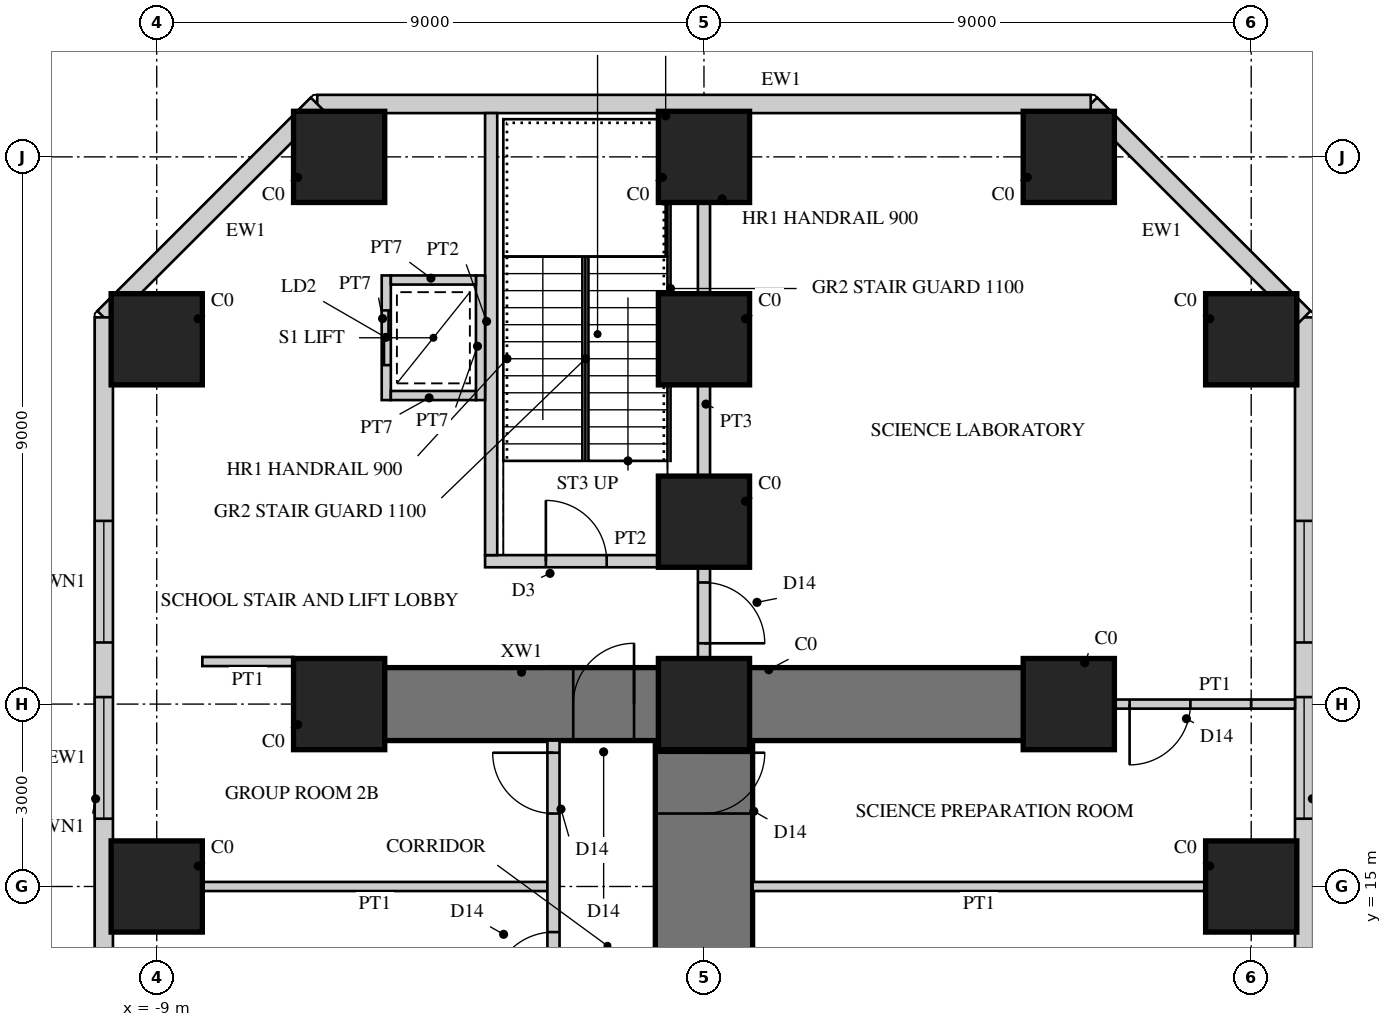
"""IFC4 building model, lengths in metres.
Left out: names, types, materials, properties, quantities, classifications, styles, units other than length and angle.
Written with IfcOpenShell. Run it as: python <this file> out.ifc"""

import sys

from ifc_helpers import new_model, si_unit, direction, frame, frame_2d, origin, origin_2d, place, context, subcontext, project, spatial, rectangle, hollow_rectangle, extrude, element, fill, save


model = new_model("IFC4")
c1 = context("Model", 3, precision=1e-05, world=origin(), true_north=direction((0.0, 1.0)))
c2 = subcontext(c1, "Body", "Model", "MODEL_VIEW")
j1 = project(units=[si_unit("LENGTHUNIT", "METRE"), si_unit("PLANEANGLEUNIT", "RADIAN")], contexts=[c1])
p1 = place(None, origin())
s1 = spatial("IfcSite", under=j1, at=p1, CompositionType="ELEMENT")
p2 = place(p1, origin())
s2 = spatial("IfcBuilding", under=s1, at=p2, CompositionType="ELEMENT")
p3 = place(p2, frame((0.0, 0.0, 9.5)))
s3 = spatial("IfcBuildingStorey", under=s2, at=p3, CompositionType="ELEMENT", Elevation=9.5)
p4 = place(p3, frame((0.0, 9.0, 0.0), z_axis=(0.0, 0.0, 1.0), x_axis=(0.0, 1.0, 0.0)))
e1 = element("IfcWall", 1, at=p4, inside=s3, PredefinedType="SHEAR", context=c2, shape_type="SweptSolid", body=[
    extrude(rectangle(XDim=9.0, YDim=1.6, at=frame_2d((4.5, 0.0))), origin(), (0.0, 0.0, 1.0), 4.5),
])
p5 = place(p4, frame((1.85, 0.0, 0.0)))
e2 = element("IfcOpeningElement", 2, at=p5, cuts=e1, PredefinedType="OPENING", context=c2, shape_type="SweptSolid", body=[
    extrude(rectangle(XDim=1.0, YDim=2.2, at=frame_2d((0.5, 1.1))), frame((0.0, 0.81, 0.0), z_axis=(0.0, -1.0, 0.0), x_axis=(1.0, 0.0, 0.0)), (0.0, 0.0, 1.0), 1.62),
])
p6 = place(p4, frame((7.2, 0.0, 0.0)))
e3 = element("IfcOpeningElement", 3, at=p6, cuts=e1, PredefinedType="OPENING", context=c2, shape_type="SweptSolid", body=[
    extrude(rectangle(XDim=1.0, YDim=2.2, at=frame_2d((0.5, 1.1))), frame((0.0, 0.81, 0.0), z_axis=(0.0, -1.0, 0.0), x_axis=(1.0, 0.0, 0.0)), (0.0, 0.0, 1.0), 1.62),
])
p7 = place(p3, frame((0.0, 18.0, 0.0), z_axis=(0.0, 0.0, 1.0), x_axis=(-1.0, 0.0, 0.0)))
e4 = element("IfcWall", 4, at=p7, inside=s3, PredefinedType="SHEAR", context=c2, shape_type="SweptSolid", body=[
    extrude(rectangle(XDim=6.0, YDim=1.2, at=frame_2d((3.0, 0.0))), origin(), (0.0, 0.0, 1.0), 4.5),
])
p8 = place(p7, frame((1.15, 0.0, 0.0)))
e5 = element("IfcOpeningElement", 5, at=p8, cuts=e4, PredefinedType="OPENING", context=c2, shape_type="SweptSolid", body=[
    extrude(rectangle(XDim=1.0, YDim=2.2, at=frame_2d((0.5, 1.1))), frame((0.0, 0.61, 0.0), z_axis=(0.0, -1.0, 0.0), x_axis=(1.0, 0.0, 0.0)), (0.0, 0.0, 1.0), 1.22),
])
p9 = place(p3, frame((0.0, 18.0, 0.0), z_axis=(0.0, 0.0, 1.0), x_axis=(1.0, 0.0, 0.0)))
e6 = element("IfcWall", 6, at=p9, inside=s3, PredefinedType="SHEAR", context=c2, shape_type="SweptSolid", body=[
    extrude(rectangle(XDim=6.0, YDim=1.2, at=frame_2d((3.0, 0.0))), origin(), (0.0, 0.0, 1.0), 4.5),
])
for number, where, z_axis, x_axis in (
    (7, (9.0, 15.0, 0.0), (0.0, 0.0, 1.0), (1.0, 0.0, 0.0)),
    (8, (9.0, 24.0, 0.0), (0.0, 0.0, 1.0), (1.0, 0.0, 0.0)),
    (9, (-9.0, 15.0, 0.0), (0.0, 0.0, 1.0), (1.0, 0.0, 0.0)),
    (10, (-9.0, 24.0, 0.0), (0.0, 0.0, 1.0), (1.0, 0.0, 0.0)),
    (11, (6.0, 27.0, 0.0), (0.0, 0.0, 1.0), (1.0, 0.0, 0.0)),
    (12, (0.0, 27.0, 0.0), (0.0, 0.0, 1.0), (1.0, 0.0, 0.0)),
    (13, (-6.0, 27.0, 0.0), (0.0, 0.0, 1.0), (1.0, 0.0, 0.0)),
    (14, (6.0, 18.0, 0.0), (0.0, 0.0, 1.0), (1.0, 0.0, 0.0)),
    (15, (0.0, 18.0, 0.0), (0.0, 0.0, 1.0), (1.0, 0.0, 0.0)),
    (16, (-6.0, 18.0, 0.0), (0.0, 0.0, 1.0), (1.0, 0.0, 0.0)),
    (17, (0.0, 21.0, 0.0), (0.0, 0.0, 1.0), (1.0, 0.0, 0.0)),
    (18, (0.0, 24.0, 0.0), (0.0, 0.0, 1.0), (1.0, 0.0, 0.0)),
):
    element("IfcColumn", number, at=place(p3, frame(where, z_axis=z_axis, x_axis=x_axis)), inside=s3, PredefinedType="COLUMN", context=c2, shape_type="SweptSolid", body=[
        extrude(rectangle(XDim=1.5, YDim=1.5, at=origin_2d()), origin(), (0.0, 0.0, 1.0), 4.5),
    ])
p10 = place(p3, frame((9.87, 9.87, 0.0), z_axis=(0.0, 0.0, 1.0), x_axis=(0.0, 1.0, 0.0)))
e19 = element("IfcWall", 19, at=p10, inside=s3, PredefinedType="SOLIDWALL", context=c2, shape_type="SweptSolid", body=[
    extrude(rectangle(XDim=14.49, YDim=0.3, at=frame_2d((7.245, 0.0))), origin(), (0.0, 0.0, 1.0), 4.3),
])
p11 = place(p10, frame((6.245, 0.0, 0.9)))
e20 = element("IfcOpeningElement", 20, at=p11, cuts=e19, PredefinedType="OPENING", context=c2, shape_type="SweptSolid", body=[
    extrude(rectangle(XDim=2.0, YDim=1.8, at=frame_2d((1.0, 0.9))), frame((0.0, 0.16, 0.0), z_axis=(0.0, -1.0, 0.0), x_axis=(1.0, 0.0, 0.0)), (0.0, 0.0, 1.0), 0.32),
])
p12 = place(p10, frame((9.143, 0.0, 0.9)))
e21 = element("IfcOpeningElement", 21, at=p12, cuts=e19, PredefinedType="OPENING", context=c2, shape_type="SweptSolid", body=[
    extrude(rectangle(XDim=2.0, YDim=1.8, at=frame_2d((1.0, 0.9))), frame((0.0, 0.16, 0.0), z_axis=(0.0, -1.0, 0.0), x_axis=(1.0, 0.0, 0.0)), (0.0, 0.0, 1.0), 0.32),
])
p13 = place(p3, frame((9.87, 24.36, 0.0), z_axis=(0.0, 0.0, 1.0), x_axis=(-0.707106781187, 0.707106781187, 0.0)))
e22 = element("IfcWall", 22, at=p13, inside=s3, PredefinedType="SOLIDWALL", context=c2, shape_type="SweptSolid", body=[
    extrude(rectangle(XDim=4.964, YDim=0.3, at=frame_2d((2.482, 0.0))), origin(), (0.0, 0.0, 1.0), 4.3),
])
p14 = place(p3, frame((6.36, 27.87, 0.0), z_axis=(0.0, 0.0, 1.0), x_axis=(-1.0, 0.0, 0.0)))
e23 = element("IfcWall", 23, at=p14, inside=s3, PredefinedType="SOLIDWALL", context=c2, shape_type="SweptSolid", body=[
    extrude(rectangle(XDim=12.721, YDim=0.3, at=frame_2d((6.36, 0.0))), origin(), (0.0, 0.0, 1.0), 4.3),
])
p15 = place(p3, frame((-6.36, 27.87, 0.0), z_axis=(0.0, 0.0, 1.0), x_axis=(-0.707106781187, -0.707106781187, 0.0)))
e24 = element("IfcWall", 24, at=p15, inside=s3, PredefinedType="SOLIDWALL", context=c2, shape_type="SweptSolid", body=[
    extrude(rectangle(XDim=4.964, YDim=0.3, at=frame_2d((2.482, 0.0))), origin(), (0.0, 0.0, 1.0), 4.3),
])
p16 = place(p3, frame((-9.87, 24.36, 0.0), z_axis=(0.0, 0.0, 1.0), x_axis=(0.0, -1.0, 0.0)))
e25 = element("IfcWall", 25, at=p16, inside=s3, PredefinedType="SOLIDWALL", context=c2, shape_type="SweptSolid", body=[
    extrude(rectangle(XDim=14.49, YDim=0.3, at=frame_2d((7.245, 0.0))), origin(), (0.0, 0.0, 1.0), 4.3),
])
p17 = place(p16, frame((3.347, 0.0, 0.9)))
e26 = element("IfcOpeningElement", 26, at=p17, cuts=e25, PredefinedType="OPENING", context=c2, shape_type="SweptSolid", body=[
    extrude(rectangle(XDim=2.0, YDim=1.8, at=frame_2d((1.0, 0.9))), frame((0.0, 0.16, 0.0), z_axis=(0.0, -1.0, 0.0), x_axis=(1.0, 0.0, 0.0)), (0.0, 0.0, 1.0), 0.32),
])
p18 = place(p16, frame((6.245, 0.0, 0.9)))
e27 = element("IfcOpeningElement", 27, at=p18, cuts=e25, PredefinedType="OPENING", context=c2, shape_type="SweptSolid", body=[
    extrude(rectangle(XDim=2.0, YDim=1.8, at=frame_2d((1.0, 0.9))), frame((0.0, 0.16, 0.0), z_axis=(0.0, -1.0, 0.0), x_axis=(1.0, 0.0, 0.0)), (0.0, 0.0, 1.0), 0.32),
])
p19 = place(p3, frame((-2.575, 15.0, 0.0), z_axis=(0.0, 0.0, 1.0), x_axis=(-1.0, 0.0, 0.0)))
e28 = element("IfcWall", 28, at=p19, inside=s3, PredefinedType="PARTITIONING", context=c2, shape_type="SweptSolid", body=[
    extrude(rectangle(XDim=5.675, YDim=0.15, at=frame_2d((2.837, 0.0))), origin(), (0.0, 0.0, 1.0), 3.35),
])
p20 = place(p3, frame((8.25, 15.0, 0.0), z_axis=(0.0, 0.0, 1.0), x_axis=(-1.0, 0.0, 0.0)))
e29 = element("IfcWall", 29, at=p20, inside=s3, PredefinedType="PARTITIONING", context=c2, shape_type="SweptSolid", body=[
    extrude(rectangle(XDim=7.45, YDim=0.15, at=frame_2d((3.725, 0.0))), origin(), (0.0, 0.0, 1.0), 3.35),
])
p21 = place(p3, frame((-2.475, 9.65, 0.0), z_axis=(0.0, 0.0, 1.0), x_axis=(0.0, 1.0, 0.0)))
e30 = element("IfcWall", 30, at=p21, inside=s3, PredefinedType="SOLIDWALL", context=c2, shape_type="SweptSolid", body=[
    extrude(rectangle(XDim=7.75, YDim=0.2, at=frame_2d((3.875, 0.0))), origin(), (0.0, 0.0, 1.0), 4.3),
])
p22 = place(p21, frame((1.2, 0.0, 0.0)))
e31 = element("IfcOpeningElement", 31, at=p22, cuts=e30, PredefinedType="OPENING", context=c2, shape_type="SweptSolid", body=[
    extrude(rectangle(XDim=1.0, YDim=2.2, at=frame_2d((0.5, 1.1))), frame((0.0, 0.11, 0.0), z_axis=(0.0, -1.0, 0.0), x_axis=(1.0, 0.0, 0.0)), (0.0, 0.0, 1.0), 0.22),
])
p23 = place(p21, frame((3.6, 0.0, 0.0)))
e32 = element("IfcOpeningElement", 32, at=p23, cuts=e30, PredefinedType="OPENING", context=c2, shape_type="SweptSolid", body=[
    extrude(rectangle(XDim=1.0, YDim=2.2, at=frame_2d((0.5, 1.1))), frame((0.0, 0.11, 0.0), z_axis=(0.0, -1.0, 0.0), x_axis=(1.0, 0.0, 0.0)), (0.0, 0.0, 1.0), 0.22),
])
p24 = place(p21, frame((6.55, 0.0, 0.0)))
e33 = element("IfcOpeningElement", 33, at=p24, cuts=e30, PredefinedType="OPENING", context=c2, shape_type="SweptSolid", body=[
    extrude(rectangle(XDim=1.0, YDim=2.2, at=frame_2d((0.5, 1.1))), frame((0.0, 0.11, 0.0), z_axis=(0.0, -1.0, 0.0), x_axis=(1.0, 0.0, 0.0)), (0.0, 0.0, 1.0), 0.22),
])
p25 = place(p3, frame((-6.75, 18.7, 0.0), z_axis=(0.0, 0.0, 1.0), x_axis=(-1.0, 0.0, 0.0)))
e34 = element("IfcWall", 34, at=p25, inside=s3, PredefinedType="PARTITIONING", context=c2, shape_type="SweptSolid", body=[
    extrude(rectangle(XDim=1.5, YDim=0.15, at=frame_2d((0.75, 0.0))), origin(), (0.0, 0.0, 1.0), 4.3),
])
p26 = place(p3, frame((-0.1, 20.35, 0.0), z_axis=(0.0, 0.0, 1.0), x_axis=(-1.0, 0.0, 0.0)))
e35 = element("IfcWall", 35, at=p26, inside=s3, PredefinedType="SOLIDWALL", context=c2, shape_type="SweptSolid", body=[
    extrude(rectangle(XDim=3.5, YDim=0.2, at=frame_2d((1.75, 0.0))), origin(), (0.0, 0.0, 1.0), 4.3),
])
p27 = place(p26, frame((1.5, 0.0, 0.0)))
e36 = element("IfcOpeningElement", 36, at=p27, cuts=e35, PredefinedType="OPENING", context=c2, shape_type="SweptSolid", body=[
    extrude(rectangle(XDim=1.0, YDim=2.1, at=frame_2d((0.5, 1.05))), frame((0.0, 0.11, 0.0), z_axis=(0.0, -1.0, 0.0), x_axis=(1.0, 0.0, 0.0)), (0.0, 0.0, 1.0), 0.22),
])
p28 = place(p3, frame((-3.5, 20.45, 0.0), z_axis=(0.0, 0.0, 1.0), x_axis=(0.0, 1.0, 0.0)))
e37 = element("IfcWall", 37, at=p28, inside=s3, PredefinedType="SOLIDWALL", context=c2, shape_type="SweptSolid", body=[
    extrude(rectangle(XDim=7.27, YDim=0.2, at=frame_2d((3.635, 0.0))), origin(), (0.0, 0.0, 1.0), 4.3),
])
p29 = place(p3, frame((-3.675, 23.0, 0.0), z_axis=(0.0, 0.0, 1.0), x_axis=(0.0, 1.0, 0.0)))
e38 = element("IfcWall", 38, at=p29, inside=s3, PredefinedType="PARTITIONING", context=c2, shape_type="SweptSolid", body=[
    extrude(rectangle(XDim=2.05, YDim=0.15, at=frame_2d((1.025, 0.0))), origin(), (0.0, 0.0, 1.0), 4.3),
])
p30 = place(p3, frame((-5.225, 23.0, 0.0), z_axis=(0.0, 0.0, 1.0), x_axis=(0.0, 1.0, 0.0)))
e39 = element("IfcWall", 39, at=p30, inside=s3, PredefinedType="PARTITIONING", context=c2, shape_type="SweptSolid", body=[
    extrude(rectangle(XDim=2.05, YDim=0.15, at=frame_2d((1.025, 0.0))), origin(), (0.0, 0.0, 1.0), 4.3),
])
p31 = place(p30, frame((0.575, 0.0, 0.0)))
e40 = element("IfcOpeningElement", 40, at=p31, cuts=e39, PredefinedType="OPENING", context=c2, shape_type="SweptSolid", body=[
    extrude(rectangle(XDim=0.9, YDim=2.1, at=frame_2d((0.45, 1.05))), frame((0.0, 0.085, 0.0), z_axis=(0.0, -1.0, 0.0), x_axis=(1.0, 0.0, 0.0)), (0.0, 0.0, 1.0), 0.17),
])
for number, where, z_axis, x_axis in (
    (41, (-3.75, 23.075, 0.0), (0.0, 0.0, 1.0), (-1.0, 0.0, 0.0)),
    (42, (-3.75, 24.975, 0.0), (0.0, 0.0, 1.0), (-1.0, 0.0, 0.0)),
):
    element("IfcWall", number, at=place(p3, frame(where, z_axis=z_axis, x_axis=x_axis)), inside=s3, PredefinedType="PARTITIONING", context=c2, shape_type="SweptSolid", body=[
        extrude(rectangle(XDim=1.4, YDim=0.15, at=frame_2d((0.7, 0.0))), origin(), (0.0, 0.0, 1.0), 4.3),
    ])
p32 = place(p3, frame((6.75, 18.0, 0.0), z_axis=(0.0, 0.0, 1.0), x_axis=(1.0, 0.0, 0.0)))
e43 = element("IfcWall", 43, at=p32, inside=s3, PredefinedType="PARTITIONING", context=c2, shape_type="SweptSolid", body=[
    extrude(rectangle(XDim=2.25, YDim=0.15, at=frame_2d((1.125, 0.0))), origin(), (0.0, 0.0, 1.0), 3.35),
])
p33 = place(p32, frame((0.25, 0.0, 0.0)))
e44 = element("IfcOpeningElement", 44, at=p33, cuts=e43, PredefinedType="OPENING", context=c2, shape_type="SweptSolid", body=[
    extrude(rectangle(XDim=1.0, YDim=2.2, at=frame_2d((0.5, 1.1))), frame((0.0, 0.085, 0.0), z_axis=(0.0, -1.0, 0.0), x_axis=(1.0, 0.0, 0.0)), (0.0, 0.0, 1.0), 0.17),
])
p34 = place(p3, frame((9.0, 18.0, 0.0), z_axis=(0.0, 0.0, 1.0), x_axis=(1.0, 0.0, 0.0)))
e45 = element("IfcWall", 45, at=p34, inside=s3, PredefinedType="PARTITIONING", context=c2, shape_type="SweptSolid", body=[
    extrude(rectangle(XDim=0.72, YDim=0.15, at=frame_2d((0.36, 0.0))), origin(), (0.0, 0.0, 1.0), 4.3),
])
p35 = place(p3, frame((0.0, 18.0, 0.0), z_axis=(0.0, 0.0, 1.0), x_axis=(0.0, 1.0, 0.0)))
e46 = element("IfcWall", 46, at=p35, inside=s3, PredefinedType="SOLIDWALL", context=c2, shape_type="SweptSolid", body=[
    extrude(rectangle(XDim=3.0, YDim=0.2, at=frame_2d((1.5, 0.0))), origin(), (0.0, 0.0, 1.0), 4.3),
])
p36 = place(p35, frame((1.0, 0.0, 0.0)))
e47 = element("IfcOpeningElement", 47, at=p36, cuts=e46, PredefinedType="OPENING", context=c2, shape_type="SweptSolid", body=[
    extrude(rectangle(XDim=1.0, YDim=2.2, at=frame_2d((0.5, 1.1))), frame((0.0, 0.11, 0.0), z_axis=(0.0, -1.0, 0.0), x_axis=(1.0, 0.0, 0.0)), (0.0, 0.0, 1.0), 0.22),
])
p37 = place(p3, frame((0.0, 21.0, 0.0), z_axis=(0.0, 0.0, 1.0), x_axis=(0.0, 1.0, 0.0)))
e48 = element("IfcWall", 48, at=p37, inside=s3, PredefinedType="SOLIDWALL", context=c2, shape_type="SweptSolid", body=[
    extrude(rectangle(XDim=6.0, YDim=0.2, at=frame_2d((3.0, 0.0))), origin(), (0.0, 0.0, 1.0), 3.3),
])
p38 = place(p11, origin())
e49 = element("IfcWindow", 49, at=p38, inside=s3, PartitioningType="SINGLE_PANEL", PredefinedType="WINDOW", context=c2, shape_type="SweptSolid", body=[
    extrude(hollow_rectangle(XDim=2.0, YDim=1.8, WallThickness=0.06, at=frame_2d((1.0, 0.9))), frame((0.0, 0.03, 0.0), z_axis=(0.0, -1.0, 0.0), x_axis=(1.0, 0.0, 0.0)), (0.0, 0.0, 1.0), 0.06),
    extrude(rectangle(XDim=1.879, YDim=1.679, at=frame_2d((1.0, 0.9))), frame((0.0, 0.03, 0.0), z_axis=(0.0, -1.0, 0.0), x_axis=(1.0, 0.0, 0.0)), (0.0, 0.0, 1.0), 0.06),
])
fill(e20, e49)
p39 = place(p12, origin())
e50 = element("IfcWindow", 50, at=p39, inside=s3, PartitioningType="SINGLE_PANEL", PredefinedType="WINDOW", context=c2, shape_type="SweptSolid", body=[
    extrude(hollow_rectangle(XDim=2.0, YDim=1.8, WallThickness=0.06, at=frame_2d((1.0, 0.9))), frame((0.0, 0.03, 0.0), z_axis=(0.0, -1.0, 0.0), x_axis=(1.0, 0.0, 0.0)), (0.0, 0.0, 1.0), 0.06),
    extrude(rectangle(XDim=1.879, YDim=1.679, at=frame_2d((1.0, 0.9))), frame((0.0, 0.03, 0.0), z_axis=(0.0, -1.0, 0.0), x_axis=(1.0, 0.0, 0.0)), (0.0, 0.0, 1.0), 0.06),
])
fill(e21, e50)
p40 = place(p17, origin())
e51 = element("IfcWindow", 51, at=p40, inside=s3, PartitioningType="SINGLE_PANEL", PredefinedType="WINDOW", context=c2, shape_type="SweptSolid", body=[
    extrude(hollow_rectangle(XDim=2.0, YDim=1.8, WallThickness=0.06, at=frame_2d((1.0, 0.9))), frame((0.0, 0.03, 0.0), z_axis=(0.0, -1.0, 0.0), x_axis=(1.0, 0.0, 0.0)), (0.0, 0.0, 1.0), 0.06),
    extrude(rectangle(XDim=1.879, YDim=1.679, at=frame_2d((1.0, 0.9))), frame((0.0, 0.03, 0.0), z_axis=(0.0, -1.0, 0.0), x_axis=(1.0, 0.0, 0.0)), (0.0, 0.0, 1.0), 0.06),
])
fill(e26, e51)
p41 = place(p18, origin())
e52 = element("IfcWindow", 52, at=p41, inside=s3, PartitioningType="SINGLE_PANEL", PredefinedType="WINDOW", context=c2, shape_type="SweptSolid", body=[
    extrude(hollow_rectangle(XDim=2.0, YDim=1.8, WallThickness=0.06, at=frame_2d((1.0, 0.9))), frame((0.0, 0.03, 0.0), z_axis=(0.0, -1.0, 0.0), x_axis=(1.0, 0.0, 0.0)), (0.0, 0.0, 1.0), 0.06),
    extrude(rectangle(XDim=1.879, YDim=1.679, at=frame_2d((1.0, 0.9))), frame((0.0, 0.03, 0.0), z_axis=(0.0, -1.0, 0.0), x_axis=(1.0, 0.0, 0.0)), (0.0, 0.0, 1.0), 0.06),
])
fill(e27, e52)
p42 = place(p23, origin())
e53 = element("IfcDoor", 53, at=p42, inside=s3, OperationType="SINGLE_SWING_LEFT", PredefinedType="DOOR", context=c2, shape_type="SweptSolid", body=[
    extrude(rectangle(XDim=1.0, YDim=2.2, at=frame_2d((0.5, 1.1))), frame((0.0, 0.025, 0.0), z_axis=(0.0, -1.0, 0.0), x_axis=(1.0, 0.0, 0.0)), (0.0, 0.0, 1.0), 0.05),
])
fill(e32, e53)
p43 = place(p24, origin())
e54 = element("IfcDoor", 54, at=p43, inside=s3, OperationType="SINGLE_SWING_RIGHT", PredefinedType="DOOR", context=c2, shape_type="SweptSolid", body=[
    extrude(rectangle(XDim=1.0, YDim=2.2, at=frame_2d((0.5, 1.1))), frame((0.0, 0.025, 0.0), z_axis=(0.0, -1.0, 0.0), x_axis=(1.0, 0.0, 0.0)), (0.0, 0.0, 1.0), 0.05),
])
fill(e33, e54)
p44 = place(p27, frame((1.0, 0.0, 0.0), z_axis=(0.0, 0.0, 1.0), x_axis=(-1.0, 0.0, 0.0)))
e55 = element("IfcDoor", 55, at=p44, inside=s3, OperationType="SINGLE_SWING_LEFT", PredefinedType="DOOR", context=c2, shape_type="SweptSolid", body=[
    extrude(rectangle(XDim=1.0, YDim=2.1, at=frame_2d((0.5, 1.05))), frame((0.0, 0.025, 0.0), z_axis=(0.0, -1.0, 0.0), x_axis=(1.0, 0.0, 0.0)), (0.0, 0.0, 1.0), 0.05),
])
fill(e36, e55)
p45 = place(p31, origin())
e56 = element("IfcDoor", 56, at=p45, inside=s3, OperationType="DOUBLE_DOOR_SLIDING", PredefinedType="DOOR", context=c2, shape_type="SweptSolid", body=[
    extrude(rectangle(XDim=0.9, YDim=2.1, at=frame_2d((0.45, 1.05))), frame((0.0, 0.025, 0.0), z_axis=(0.0, -1.0, 0.0), x_axis=(1.0, 0.0, 0.0)), (0.0, 0.0, 1.0), 0.05),
])
fill(e40, e56)
p46 = place(p33, frame((1.0, 0.0, 0.0), z_axis=(0.0, 0.0, 1.0), x_axis=(-1.0, 0.0, 0.0)))
e57 = element("IfcDoor", 57, at=p46, inside=s3, OperationType="SINGLE_SWING_RIGHT", PredefinedType="DOOR", context=c2, shape_type="SweptSolid", body=[
    extrude(rectangle(XDim=1.0, YDim=2.2, at=frame_2d((0.5, 1.1))), frame((0.0, 0.025, 0.0), z_axis=(0.0, -1.0, 0.0), x_axis=(1.0, 0.0, 0.0)), (0.0, 0.0, 1.0), 0.05),
])
fill(e44, e57)
p47 = place(p6, frame((1.0, 0.0, 0.0), z_axis=(0.0, 0.0, 1.0), x_axis=(-1.0, 0.0, 0.0)))
e58 = element("IfcDoor", 58, at=p47, inside=s3, OperationType="SINGLE_SWING_LEFT", PredefinedType="DOOR", context=c2, shape_type="SweptSolid", body=[
    extrude(rectangle(XDim=1.0, YDim=2.2, at=frame_2d((0.5, 1.1))), frame((0.0, 0.025, 0.0), z_axis=(0.0, -1.0, 0.0), x_axis=(1.0, 0.0, 0.0)), (0.0, 0.0, 1.0), 0.05),
])
fill(e3, e58)
p48 = place(p36, frame((1.0, 0.0, 0.0), z_axis=(0.0, 0.0, 1.0), x_axis=(-1.0, 0.0, 0.0)))
e59 = element("IfcDoor", 59, at=p48, inside=s3, OperationType="SINGLE_SWING_RIGHT", PredefinedType="DOOR", context=c2, shape_type="SweptSolid", body=[
    extrude(rectangle(XDim=1.0, YDim=2.2, at=frame_2d((0.5, 1.1))), frame((0.0, 0.025, 0.0), z_axis=(0.0, -1.0, 0.0), x_axis=(1.0, 0.0, 0.0)), (0.0, 0.0, 1.0), 0.05),
])
fill(e47, e59)
p49 = place(p8, frame((1.0, 0.0, 0.0), z_axis=(0.0, 0.0, 1.0), x_axis=(-1.0, 0.0, 0.0)))
e60 = element("IfcDoor", 60, at=p49, inside=s3, OperationType="SINGLE_SWING_RIGHT", PredefinedType="DOOR", context=c2, shape_type="SweptSolid", body=[
    extrude(rectangle(XDim=1.0, YDim=2.2, at=frame_2d((0.5, 1.1))), frame((0.0, 0.025, 0.0), z_axis=(0.0, -1.0, 0.0), x_axis=(1.0, 0.0, 0.0)), (0.0, 0.0, 1.0), 0.05),
])
fill(e5, e60)
save(model, sys.argv[1])
